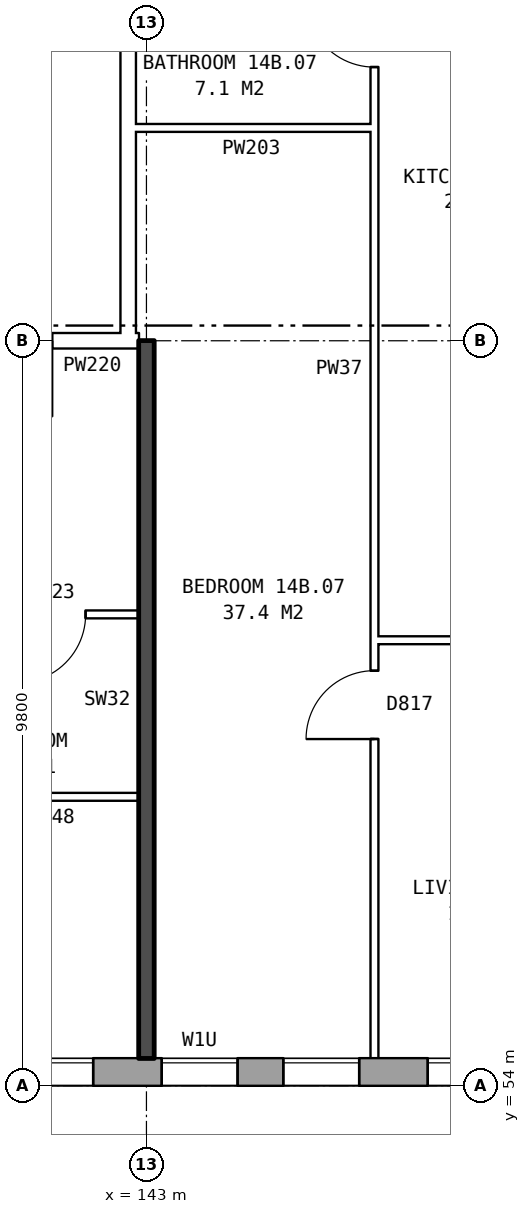
"""IFC4 building model, lengths in metres.
Left out: names, types, materials, properties, quantities, classifications, styles, units other than length and angle.
Written with IfcOpenShell. Run it as: python <this file> out.ifc"""

import sys

from ifc_helpers import new_model, si_unit, direction, frame, frame_2d, origin, place, context, subcontext, project, spatial, rectangle, extrude, element, fill, save


model = new_model("IFC4")
c1 = context("Model", 3, precision=1e-05, world=origin(), true_north=direction((0.0, 1.0)))
c2 = subcontext(c1, "Body", "Model", "MODEL_VIEW")
j1 = project(units=[si_unit("LENGTHUNIT", "METRE"), si_unit("PLANEANGLEUNIT", "RADIAN")], contexts=[c1])
p1 = place(None, origin())
s1 = spatial("IfcSite", under=j1, at=p1, CompositionType="ELEMENT")
p2 = place(p1, origin())
s2 = spatial("IfcBuilding", under=s1, at=p2, CompositionType="ELEMENT")
p3 = place(p2, frame((0.0, 0.0, 53.6)))
s3 = spatial("IfcBuildingStorey", under=s2, at=p3, CompositionType="ELEMENT", Elevation=53.6)
p4 = place(p3, frame((134.075, 54.18, 0.0), z_axis=(0.0, 0.0, 1.0), x_axis=(1.0, 0.0, 0.0)))
e1 = element("IfcWall", 1, at=p4, inside=s3, PredefinedType="STANDARD", context=c2, shape_type="SweptSolid", body=[
    extrude(rectangle(XDim=39.351, YDim=0.36, at=frame_2d((19.675, 0.0))), origin(), (0.0, 0.0, 1.0), 2.85),
])
p5 = place(p4, frame((0.625, 0.0, 0.8)))
e2 = element("IfcOpeningElement", 2, at=p5, cuts=e1, PredefinedType="OPENING", context=c2, shape_type="SweptSolid", body=[
    extrude(rectangle(XDim=1.6, YDim=1.8, at=frame_2d((0.8, 0.9))), frame((0.0, 0.19, 0.0), z_axis=(0.0, -1.0, 0.0), x_axis=(1.0, 0.0, 0.0)), (0.0, 0.0, 1.0), 0.38),
])
p6 = place(p4, frame((3.625, 0.0, 0.8)))
e3 = element("IfcOpeningElement", 3, at=p6, cuts=e1, PredefinedType="OPENING", context=c2, shape_type="SweptSolid", body=[
    extrude(rectangle(XDim=1.6, YDim=1.8, at=frame_2d((0.8, 0.9))), frame((0.0, 0.19, 0.0), z_axis=(0.0, -1.0, 0.0), x_axis=(1.0, 0.0, 0.0)), (0.0, 0.0, 1.0), 0.38),
])
p7 = place(p4, frame((6.625, 0.0, 0.8)))
e4 = element("IfcOpeningElement", 4, at=p7, cuts=e1, PredefinedType="OPENING", context=c2, shape_type="SweptSolid", body=[
    extrude(rectangle(XDim=1.6, YDim=1.8, at=frame_2d((0.8, 0.9))), frame((0.0, 0.19, 0.0), z_axis=(0.0, -1.0, 0.0), x_axis=(1.0, 0.0, 0.0)), (0.0, 0.0, 1.0), 0.38),
])
p8 = place(p4, frame((9.125, 0.0, 1.65)))
e5 = element("IfcOpeningElement", 5, at=p8, cuts=e1, PredefinedType="OPENING", context=c2, shape_type="SweptSolid", body=[
    extrude(rectangle(XDim=1.0, YDim=0.9, at=frame_2d((0.5, 0.45))), frame((0.0, 0.19, 0.0), z_axis=(0.0, -1.0, 0.0), x_axis=(1.0, 0.0, 0.0)), (0.0, 0.0, 1.0), 0.38),
])
p9 = place(p4, frame((12.625, 0.0, 0.8)))
e6 = element("IfcOpeningElement", 6, at=p9, cuts=e1, PredefinedType="OPENING", context=c2, shape_type="SweptSolid", body=[
    extrude(rectangle(XDim=1.6, YDim=1.8, at=frame_2d((0.8, 0.9))), frame((0.0, 0.19, 0.0), z_axis=(0.0, -1.0, 0.0), x_axis=(1.0, 0.0, 0.0)), (0.0, 0.0, 1.0), 0.38),
])
p10 = place(p4, frame((15.625, 0.0, 0.8)))
e7 = element("IfcOpeningElement", 7, at=p10, cuts=e1, PredefinedType="OPENING", context=c2, shape_type="SweptSolid", body=[
    extrude(rectangle(XDim=1.6, YDim=1.8, at=frame_2d((0.8, 0.9))), frame((0.0, 0.19, 0.0), z_axis=(0.0, -1.0, 0.0), x_axis=(1.0, 0.0, 0.0)), (0.0, 0.0, 1.0), 0.38),
])
p11 = place(p4, frame((18.625, 0.0, 0.8)))
e8 = element("IfcOpeningElement", 8, at=p11, cuts=e1, PredefinedType="OPENING", context=c2, shape_type="SweptSolid", body=[
    extrude(rectangle(XDim=1.6, YDim=1.8, at=frame_2d((0.8, 0.9))), frame((0.0, 0.19, 0.0), z_axis=(0.0, -1.0, 0.0), x_axis=(1.0, 0.0, 0.0)), (0.0, 0.0, 1.0), 0.38),
])
p12 = place(p4, frame((21.625, 0.0, 0.8)))
e9 = element("IfcOpeningElement", 9, at=p12, cuts=e1, PredefinedType="OPENING", context=c2, shape_type="SweptSolid", body=[
    extrude(rectangle(XDim=1.6, YDim=1.8, at=frame_2d((0.8, 0.9))), frame((0.0, 0.19, 0.0), z_axis=(0.0, -1.0, 0.0), x_axis=(1.0, 0.0, 0.0)), (0.0, 0.0, 1.0), 0.38),
])
p13 = place(p4, frame((24.625, 0.0, 0.8)))
e10 = element("IfcOpeningElement", 10, at=p13, cuts=e1, PredefinedType="OPENING", context=c2, shape_type="SweptSolid", body=[
    extrude(rectangle(XDim=1.6, YDim=1.8, at=frame_2d((0.8, 0.9))), frame((0.0, 0.19, 0.0), z_axis=(0.0, -1.0, 0.0), x_axis=(1.0, 0.0, 0.0)), (0.0, 0.0, 1.0), 0.38),
])
p14 = place(p4, frame((27.125, 0.0, 0.8)))
e11 = element("IfcOpeningElement", 11, at=p14, cuts=e1, PredefinedType="OPENING", context=c2, shape_type="SweptSolid", body=[
    extrude(rectangle(XDim=0.6, YDim=0.9, at=frame_2d((0.3, 0.45))), frame((0.0, 0.19, 0.0), z_axis=(0.0, -1.0, 0.0), x_axis=(1.0, 0.0, 0.0)), (0.0, 0.0, 1.0), 0.38),
])
p15 = place(p4, frame((30.625, 0.0, 0.8)))
e12 = element("IfcOpeningElement", 12, at=p15, cuts=e1, PredefinedType="OPENING", context=c2, shape_type="SweptSolid", body=[
    extrude(rectangle(XDim=1.6, YDim=1.8, at=frame_2d((0.8, 0.9))), frame((0.0, 0.19, 0.0), z_axis=(0.0, -1.0, 0.0), x_axis=(1.0, 0.0, 0.0)), (0.0, 0.0, 1.0), 0.38),
])
p16 = place(p4, frame((33.625, 0.0, 0.8)))
e13 = element("IfcOpeningElement", 13, at=p16, cuts=e1, PredefinedType="OPENING", context=c2, shape_type="SweptSolid", body=[
    extrude(rectangle(XDim=1.6, YDim=1.8, at=frame_2d((0.8, 0.9))), frame((0.0, 0.19, 0.0), z_axis=(0.0, -1.0, 0.0), x_axis=(1.0, 0.0, 0.0)), (0.0, 0.0, 1.0), 0.38),
])
p17 = place(p4, frame((36.625, 0.0, 0.8)))
e14 = element("IfcOpeningElement", 14, at=p17, cuts=e1, PredefinedType="OPENING", context=c2, shape_type="SweptSolid", body=[
    extrude(rectangle(XDim=1.6, YDim=1.8, at=frame_2d((0.8, 0.9))), frame((0.0, 0.19, 0.0), z_axis=(0.0, -1.0, 0.0), x_axis=(1.0, 0.0, 0.0)), (0.0, 0.0, 1.0), 0.38),
])
p18 = place(p4, frame((10.725, 0.0, 0.15)))
e15 = element("IfcOpeningElement", 15, at=p18, cuts=e1, PredefinedType="OPENING", context=c2, shape_type="SweptSolid", body=[
    extrude(rectangle(XDim=1.0, YDim=0.9, at=frame_2d((0.5, 0.45))), frame((0.0, 0.19, 0.0), z_axis=(0.0, -1.0, 0.0), x_axis=(1.0, 0.0, 0.0)), (0.0, 0.0, 1.0), 0.38),
])
p19 = place(p4, frame((29.075, 0.0, 1.7)))
e16 = element("IfcOpeningElement", 16, at=p19, cuts=e1, PredefinedType="OPENING", context=c2, shape_type="SweptSolid", body=[
    extrude(rectangle(XDim=1.2, YDim=0.9, at=frame_2d((0.6, 0.45))), frame((0.0, 0.19, 0.0), z_axis=(0.0, -1.0, 0.0), x_axis=(1.0, 0.0, 0.0)), (0.0, 0.0, 1.0), 0.38),
])
p20 = place(p3, frame((142.76, 63.9, 0.0), z_axis=(0.0, 0.0, 1.0), x_axis=(0.0, 1.0, 0.0)))
e17 = element("IfcWall", 17, at=p20, inside=s3, PredefinedType="PARTITIONING", context=c2, shape_type="SweptSolid", body=[
    extrude(rectangle(XDim=12.2, YDim=0.2, at=frame_2d((6.1, 0.0))), origin(), (0.0, 0.0, 1.0), 2.85),
])
p21 = place(p20, frame((5.1, 0.0, 0.0)))
e18 = element("IfcOpeningElement", 18, at=p21, cuts=e17, PredefinedType="OPENING", context=c2, shape_type="SweptSolid", body=[
    extrude(rectangle(XDim=2.0, YDim=2.1, at=frame_2d((1.0, 1.05))), frame((0.0, 0.11, 0.0), z_axis=(0.0, -1.0, 0.0), x_axis=(1.0, 0.0, 0.0)), (0.0, 0.0, 1.0), 0.22),
])
p22 = place(p3, frame((140.6, 57.8, 0.0), z_axis=(0.0, 0.0, 1.0), x_axis=(1.0, 0.0, 0.0)))
e19 = element("IfcWall", 19, at=p22, inside=s3, PredefinedType="PARTITIONING", context=c2, shape_type="SweptSolid", body=[
    extrude(rectangle(XDim=2.3, YDim=0.1, at=frame_2d((1.15, 0.0))), origin(), (0.0, 0.0, 1.0), 2.85),
])
p23 = place(p3, frame((146.0, 59.86, 0.0), z_axis=(0.0, 0.0, 1.0), x_axis=(1.0, 0.0, 0.0)))
e20 = element("IfcWall", 20, at=p23, inside=s3, PredefinedType="PARTITIONING", context=c2, shape_type="SweptSolid", body=[
    extrude(rectangle(XDim=6.0, YDim=0.1, at=frame_2d((3.0, 0.0))), origin(), (0.0, 0.0, 1.0), 2.85),
])
p24 = place(p23, frame((1.05, 0.0, 0.0)))
e21 = element("IfcOpeningElement", 21, at=p24, cuts=e20, PredefinedType="OPENING", context=c2, shape_type="SweptSolid", body=[
    extrude(rectangle(XDim=0.9, YDim=2.1, at=frame_2d((0.45, 1.05))), frame((0.0, 0.06, 0.0), z_axis=(0.0, -1.0, 0.0), x_axis=(1.0, 0.0, 0.0)), (0.0, 0.0, 1.0), 0.12),
])
p25 = place(p23, frame((4.05, 0.0, 0.0)))
e22 = element("IfcOpeningElement", 22, at=p25, cuts=e20, PredefinedType="OPENING", context=c2, shape_type="SweptSolid", body=[
    extrude(rectangle(XDim=0.9, YDim=2.1, at=frame_2d((0.45, 1.05))), frame((0.0, 0.06, 0.0), z_axis=(0.0, -1.0, 0.0), x_axis=(1.0, 0.0, 0.0)), (0.0, 0.0, 1.0), 0.12),
])
p26 = place(p3, frame((137.1, 60.2, 0.0), z_axis=(0.0, 0.0, 1.0), x_axis=(1.0, 0.0, 0.0)))
e23 = element("IfcWall", 23, at=p26, inside=s3, PredefinedType="PARTITIONING", context=c2, shape_type="SweptSolid", body=[
    extrude(rectangle(XDim=5.8, YDim=0.1, at=frame_2d((2.9, 0.0))), origin(), (0.0, 0.0, 1.0), 2.85),
])
p27 = place(p26, frame((1.3, 0.0, 0.0)))
e24 = element("IfcOpeningElement", 24, at=p27, cuts=e23, PredefinedType="OPENING", context=c2, shape_type="SweptSolid", body=[
    extrude(rectangle(XDim=0.9, YDim=2.1, at=frame_2d((0.45, 1.05))), frame((0.0, 0.06, 0.0), z_axis=(0.0, -1.0, 0.0), x_axis=(1.0, 0.0, 0.0)), (0.0, 0.0, 1.0), 0.12),
])
p28 = place(p26, frame((4.2, 0.0, 0.0)))
e25 = element("IfcOpeningElement", 25, at=p28, cuts=e23, PredefinedType="OPENING", context=c2, shape_type="SweptSolid", body=[
    extrude(rectangle(XDim=0.9, YDim=2.1, at=frame_2d((0.45, 1.05))), frame((0.0, 0.06, 0.0), z_axis=(0.0, -1.0, 0.0), x_axis=(1.0, 0.0, 0.0)), (0.0, 0.0, 1.0), 0.12),
])
p29 = place(p3, frame((139.76, 63.8, 0.0), z_axis=(0.0, 0.0, 1.0), x_axis=(1.0, 0.0, 0.0)))
e26 = element("IfcWall", 26, at=p29, inside=s3, PredefinedType="PARTITIONING", context=c2, shape_type="SweptSolid", body=[
    extrude(rectangle(XDim=3.0, YDim=0.2, at=frame_2d((1.5, 0.0))), origin(), (0.0, 0.0, 1.0), 2.85),
])
p30 = place(p29, frame((1.0, 0.0, 0.0)))
e27 = element("IfcOpeningElement", 27, at=p30, cuts=e26, PredefinedType="OPENING", context=c2, shape_type="SweptSolid", body=[
    extrude(rectangle(XDim=1.0, YDim=2.1, at=frame_2d((0.5, 1.05))), frame((0.0, 0.11, 0.0), z_axis=(0.0, -1.0, 0.0), x_axis=(1.0, 0.0, 0.0)), (0.0, 0.0, 1.0), 0.22),
])
p31 = place(p3, frame((142.76, 63.8, 0.0), z_axis=(0.0, 0.0, 1.0), x_axis=(1.0, 0.0, 0.0)))
e28 = element("IfcWall", 28, at=p31, inside=s3, PredefinedType="PARTITIONING", context=c2, shape_type="SweptSolid", body=[
    extrude(rectangle(XDim=0.14, YDim=0.2, at=frame_2d((0.07, 0.0))), origin(), (0.0, 0.0, 1.0), 2.85),
])
p32 = place(p3, frame((142.76, 66.6, 0.0), z_axis=(0.0, 0.0, 1.0), x_axis=(1.0, 0.0, 0.0)))
e29 = element("IfcWall", 29, at=p32, inside=s3, PredefinedType="PARTITIONING", context=c2, shape_type="SweptSolid", body=[
    extrude(rectangle(XDim=3.24, YDim=0.1, at=frame_2d((1.62, 0.0))), origin(), (0.0, 0.0, 1.0), 2.85),
])
p33 = place(p3, frame((143.0, 54.36, 0.0), z_axis=(0.0, 0.0, 1.0), x_axis=(0.0, 1.0, 0.0)))
e30 = element("IfcWall", 30, at=p33, inside=s3, PredefinedType="SOLIDWALL", context=c2, shape_type="SweptSolid", body=[
    extrude(rectangle(XDim=9.44, YDim=0.2, at=frame_2d((4.72, 0.0))), origin(), (0.0, 0.0, 1.0), 2.85),
])
p34 = place(p3, frame((146.0, 54.36, 0.0), z_axis=(0.0, 0.0, 1.0), x_axis=(0.0, 1.0, 0.0)))
e31 = element("IfcWall", 31, at=p34, inside=s3, PredefinedType="PARTITIONING", context=c2, shape_type="SweptSolid", body=[
    extrude(rectangle(XDim=14.34, YDim=0.1, at=frame_2d((7.17, 0.0))), origin(), (0.0, 0.0, 1.0), 2.85),
])
p35 = place(p34, frame((4.2, 0.0, 0.0)))
e32 = element("IfcOpeningElement", 32, at=p35, cuts=e31, PredefinedType="OPENING", context=c2, shape_type="SweptSolid", body=[
    extrude(rectangle(XDim=0.9, YDim=2.1, at=frame_2d((0.45, 1.05))), frame((0.0, 0.06, 0.0), z_axis=(0.0, -1.0, 0.0), x_axis=(1.0, 0.0, 0.0)), (0.0, 0.0, 1.0), 0.12),
])
p36 = place(p34, frame((13.04, 0.0, 0.0)))
e33 = element("IfcOpeningElement", 33, at=p36, cuts=e31, PredefinedType="OPENING", context=c2, shape_type="SweptSolid", body=[
    extrude(rectangle(XDim=0.9, YDim=2.1, at=frame_2d((0.45, 1.05))), frame((0.0, 0.06, 0.0), z_axis=(0.0, -1.0, 0.0), x_axis=(1.0, 0.0, 0.0)), (0.0, 0.0, 1.0), 0.12),
])
p37 = place(p7, origin())
e34 = element("IfcWindow", 34, at=p37, inside=s3, PartitioningType="SINGLE_PANEL", PredefinedType="WINDOW", context=c2, shape_type="SweptSolid", body=[
    extrude(rectangle(XDim=1.6, YDim=1.8, at=frame_2d((0.8, 0.9))), frame((0.0, 0.15, 0.0), z_axis=(0.0, -1.0, 0.0), x_axis=(1.0, 0.0, 0.0)), (0.0, 0.0, 1.0), 0.06),
])
fill(e4, e34)
p38 = place(p8, origin())
e35 = element("IfcWindow", 35, at=p38, inside=s3, PartitioningType="SINGLE_PANEL", PredefinedType="WINDOW", context=c2, shape_type="SweptSolid", body=[
    extrude(rectangle(XDim=1.0, YDim=0.9, at=frame_2d((0.5, 0.45))), frame((0.0, 0.15, 0.0), z_axis=(0.0, -1.0, 0.0), x_axis=(1.0, 0.0, 0.0)), (0.0, 0.0, 1.0), 0.06),
])
fill(e5, e35)
p39 = place(p9, origin())
e36 = element("IfcWindow", 36, at=p39, inside=s3, PartitioningType="SINGLE_PANEL", PredefinedType="WINDOW", context=c2, shape_type="SweptSolid", body=[
    extrude(rectangle(XDim=1.6, YDim=1.8, at=frame_2d((0.8, 0.9))), frame((0.0, 0.15, 0.0), z_axis=(0.0, -1.0, 0.0), x_axis=(1.0, 0.0, 0.0)), (0.0, 0.0, 1.0), 0.06),
])
fill(e6, e36)
p40 = place(p28, frame((0.9, 0.0, 0.0), z_axis=(0.0, 0.0, 1.0), x_axis=(-1.0, 0.0, 0.0)))
e37 = element("IfcDoor", 37, at=p40, inside=s3, OperationType="SINGLE_SWING_RIGHT", PredefinedType="DOOR", context=c2, shape_type="SweptSolid", body=[
    extrude(rectangle(XDim=0.9, YDim=2.1, at=frame_2d((0.45, 1.05))), frame((0.0, 0.025, 0.0), z_axis=(0.0, -1.0, 0.0), x_axis=(1.0, 0.0, 0.0)), (0.0, 0.0, 1.0), 0.05),
])
fill(e25, e37)
p41 = place(p35, origin())
e38 = element("IfcDoor", 38, at=p41, inside=s3, OperationType="SINGLE_SWING_LEFT", PredefinedType="DOOR", context=c2, shape_type="SweptSolid", body=[
    extrude(rectangle(XDim=0.9, YDim=2.1, at=frame_2d((0.45, 1.05))), frame((0.0, 0.025, 0.0), z_axis=(0.0, -1.0, 0.0), x_axis=(1.0, 0.0, 0.0)), (0.0, 0.0, 1.0), 0.05),
])
fill(e32, e38)
p42 = place(p36, origin())
e39 = element("IfcDoor", 39, at=p42, inside=s3, OperationType="SINGLE_SWING_RIGHT", PredefinedType="DOOR", context=c2, shape_type="SweptSolid", body=[
    extrude(rectangle(XDim=0.9, YDim=2.1, at=frame_2d((0.45, 1.05))), frame((0.0, 0.025, 0.0), z_axis=(0.0, -1.0, 0.0), x_axis=(1.0, 0.0, 0.0)), (0.0, 0.0, 1.0), 0.05),
])
fill(e33, e39)
p43 = place(p18, origin())
e40 = element("IfcWindow", 40, at=p43, inside=s3, PartitioningType="SINGLE_PANEL", PredefinedType="WINDOW", context=c2, shape_type="SweptSolid", body=[
    extrude(rectangle(XDim=1.0, YDim=0.9, at=frame_2d((0.5, 0.45))), frame((0.0, 0.15, 0.0), z_axis=(0.0, -1.0, 0.0), x_axis=(1.0, 0.0, 0.0)), (0.0, 0.0, 1.0), 0.06),
])
fill(e15, e40)
save(model, sys.argv[1])
